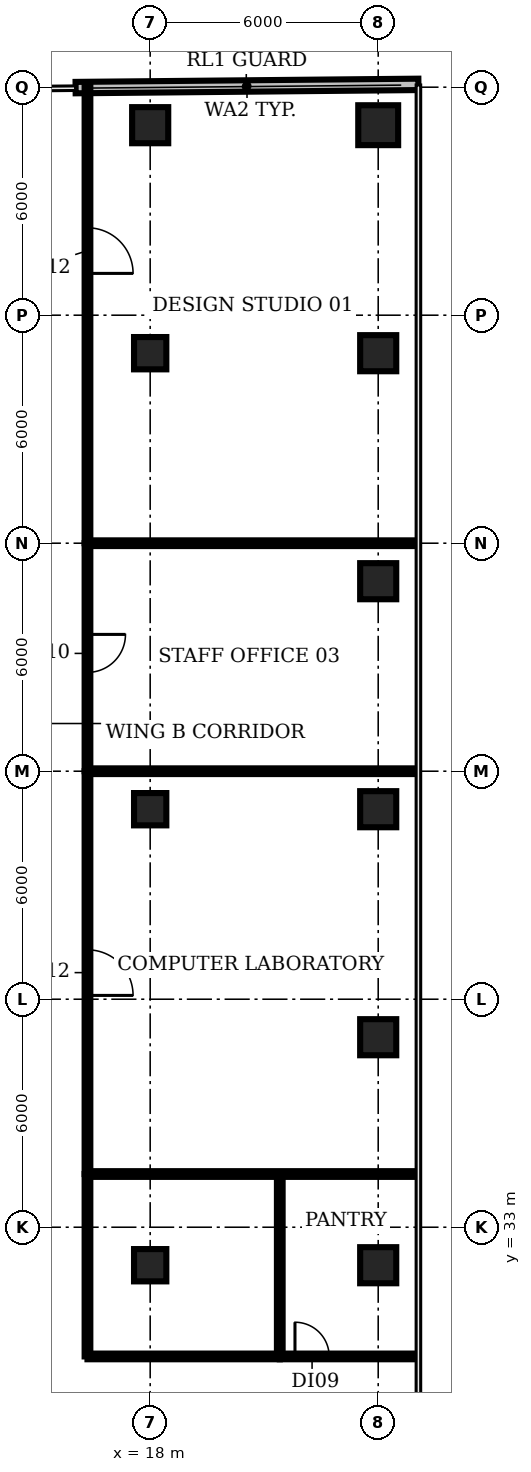
"""IFC4 building model, lengths in metres.
Left out: names, types, materials, properties, quantities, classifications, styles, units other than length and angle.
Written with IfcOpenShell. Run it as: python <this file> out.ifc"""

import sys

from ifc_helpers import new_model, si_unit, direction, frame, frame_2d, origin, origin_2d, place, context, subcontext, project, spatial, rectangle, circle, extrude, element, fill, save


model = new_model("IFC4")
c1 = context("Model", 3, precision=1e-05, world=origin(), true_north=direction((0.0, 1.0)))
c2 = subcontext(c1, "Body", "Model", "MODEL_VIEW")
j1 = project(units=[si_unit("LENGTHUNIT", "METRE"), si_unit("PLANEANGLEUNIT", "RADIAN")], contexts=[c1])
p1 = place(None, origin())
s1 = spatial("IfcSite", under=j1, at=p1, CompositionType="ELEMENT")
p2 = place(p1, origin())
s2 = spatial("IfcBuilding", under=s1, at=p2, CompositionType="ELEMENT")
p3 = place(p2, frame((0.0, 0.0, 54.2)))
s3 = spatial("IfcBuildingStorey", under=s2, at=p3, CompositionType="ELEMENT", Elevation=54.2)
for number, where, z_axis, x_axis in (
    (1, (18.0, 32.0, 0.0), (0.0, 0.0, 1.0), (1.0, 0.0, 0.0)),
    (2, (18.0, 44.0, 0.0), (0.0, 0.0, 1.0), (1.0, 0.0, 0.0)),
    (3, (18.0, 56.0, 0.0), (0.0, 0.0, 1.0), (1.0, 0.0, 0.0)),
):
    element("IfcColumn", number, at=place(p3, frame(where, z_axis=z_axis, x_axis=x_axis)), inside=s3, PredefinedType="COLUMN", context=c2, shape_type="SweptSolid", body=[
        extrude(rectangle(XDim=0.85, YDim=0.85, at=origin_2d()), origin(), (0.0, 0.0, 1.0), 3.85),
    ])
for number, where, z_axis, x_axis in (
    (4, (18.0, 62.0, 0.0), (0.0, 0.0, 1.0), (1.0, 0.0, 0.0)),
    (5, (24.0, 32.0, 0.0), (0.0, 0.0, 1.0), (1.0, 0.0, 0.0)),
    (6, (24.0, 38.0, 0.0), (0.0, 0.0, 1.0), (1.0, 0.0, 0.0)),
    (7, (24.0, 44.0, 0.0), (0.0, 0.0, 1.0), (1.0, 0.0, 0.0)),
    (8, (24.0, 50.0, 0.0), (0.0, 0.0, 1.0), (1.0, 0.0, 0.0)),
    (9, (24.0, 56.0, 0.0), (0.0, 0.0, 1.0), (1.0, 0.0, 0.0)),
):
    element("IfcColumn", number, at=place(p3, frame(where, z_axis=z_axis, x_axis=x_axis)), inside=s3, PredefinedType="COLUMN", context=c2, shape_type="SweptSolid", body=[
        extrude(rectangle(XDim=0.95, YDim=0.95, at=origin_2d()), origin(), (0.0, 0.0, 1.0), 3.85),
    ])
p4 = place(p3, frame((24.0, 62.0, 0.0), z_axis=(0.0, 0.0, 1.0), x_axis=(1.0, 0.0, 0.0)))
e10 = element("IfcColumn", 10, at=p4, inside=s3, PredefinedType="COLUMN", context=c2, shape_type="SweptSolid", body=[
    extrude(circle(Radius=0.525, at=origin_2d()), origin(), (0.0, 0.0, 1.0), 3.85),
])
p5 = place(p3, frame((25.058, 63.074, 0.0), z_axis=(0.0, 0.0, 1.0), x_axis=(-0.999955642737, -0.009418734468, 0.0)))
e11 = element("IfcWall", 11, at=p5, inside=s3, PredefinedType="SOLIDWALL", context=c2, shape_type="SweptSolid", body=[
    extrude(rectangle(XDim=9.021, YDim=0.3, at=frame_2d((4.51, 0.0))), origin(), (0.0, 0.0, 1.0), 3.85),
])
p6 = place(p3, frame((16.35, 29.6, 0.0), z_axis=(0.0, 0.0, 1.0), x_axis=(0.0, 1.0, 0.0)))
e12 = element("IfcWall", 12, at=p6, inside=s3, PredefinedType="PARTITIONING", context=c2, shape_type="SweptSolid", body=[
    extrude(rectangle(XDim=4.8, YDim=0.15, at=frame_2d((2.4, 0.0))), origin(), (0.0, 0.0, 1.0), 2.83),
])
p7 = place(p3, frame((16.35, 29.6, 0.0), z_axis=(0.0, 0.0, 1.0), x_axis=(1.0, 0.0, 0.0)))
e13 = element("IfcWall", 13, at=p7, inside=s3, PredefinedType="PARTITIONING", context=c2, shape_type="SweptSolid", body=[
    extrude(rectangle(XDim=5.06, YDim=0.15, at=frame_2d((2.53, 0.0))), origin(), (0.0, 0.0, 1.0), 2.83),
])
p8 = place(p3, frame((16.35, 34.4, 0.0), z_axis=(0.0, 0.0, 1.0), x_axis=(1.0, 0.0, 0.0)))
e14 = element("IfcWall", 14, at=p8, inside=s3, PredefinedType="PARTITIONING", context=c2, shape_type="SweptSolid", body=[
    extrude(rectangle(XDim=8.66, YDim=0.15, at=frame_2d((4.33, 0.0))), origin(), (0.0, 0.0, 1.0), 2.83),
])
p9 = place(p3, frame((16.35, 45.0, 0.0), z_axis=(0.0, 0.0, 1.0), x_axis=(0.0, -1.0, 0.0)))
e15 = element("IfcWall", 15, at=p9, inside=s3, PredefinedType="PARTITIONING", context=c2, shape_type="SweptSolid", body=[
    extrude(rectangle(XDim=10.6, YDim=0.15, at=frame_2d((5.3, 0.0))), origin(), (0.0, 0.0, 1.0), 2.83),
])
p10 = place(p9, frame((4.7, 0.0, 0.0)))
e16 = element("IfcOpeningElement", 16, at=p10, cuts=e15, PredefinedType="OPENING", context=c2, shape_type="SweptSolid", body=[
    extrude(rectangle(XDim=1.2, YDim=2.1, at=frame_2d((0.6, 1.05))), frame((0.0, 0.085, 0.0), z_axis=(0.0, -1.0, 0.0), x_axis=(1.0, 0.0, 0.0)), (0.0, 0.0, 1.0), 0.17),
])
p11 = place(p3, frame((16.35, 45.0, 0.0), z_axis=(0.0, 0.0, 1.0), x_axis=(1.0, 0.0, 0.0)))
e17 = element("IfcWall", 17, at=p11, inside=s3, PredefinedType="PARTITIONING", context=c2, shape_type="SweptSolid", body=[
    extrude(rectangle(XDim=8.66, YDim=0.15, at=frame_2d((4.33, 0.0))), origin(), (0.0, 0.0, 1.0), 2.83),
])
p12 = place(p3, frame((16.35, 51.0, 0.0), z_axis=(0.0, 0.0, 1.0), x_axis=(0.0, -1.0, 0.0)))
e18 = element("IfcWall", 18, at=p12, inside=s3, PredefinedType="PARTITIONING", context=c2, shape_type="SweptSolid", body=[
    extrude(rectangle(XDim=6.0, YDim=0.15, at=frame_2d((3.0, 0.0))), origin(), (0.0, 0.0, 1.0), 2.83),
])
p13 = place(p12, frame((2.4, 0.0, 0.0)))
e19 = element("IfcOpeningElement", 19, at=p13, cuts=e18, PredefinedType="OPENING", context=c2, shape_type="SweptSolid", body=[
    extrude(rectangle(XDim=1.0, YDim=2.1, at=frame_2d((0.5, 1.05))), frame((0.0, 0.085, 0.0), z_axis=(0.0, -1.0, 0.0), x_axis=(1.0, 0.0, 0.0)), (0.0, 0.0, 1.0), 0.17),
])
p14 = place(p3, frame((16.35, 51.0, 0.0), z_axis=(0.0, 0.0, 1.0), x_axis=(1.0, 0.0, 0.0)))
e20 = element("IfcWall", 20, at=p14, inside=s3, PredefinedType="PARTITIONING", context=c2, shape_type="SweptSolid", body=[
    extrude(rectangle(XDim=8.66, YDim=0.15, at=frame_2d((4.33, 0.0))), origin(), (0.0, 0.0, 1.0), 2.83),
])
p15 = place(p3, frame((16.35, 63.037, 0.0), z_axis=(0.0, 0.0, 1.0), x_axis=(0.0, -1.0, 0.0)))
e21 = element("IfcWall", 21, at=p15, inside=s3, PredefinedType="PARTITIONING", context=c2, shape_type="SweptSolid", body=[
    extrude(rectangle(XDim=12.037, YDim=0.15, at=frame_2d((6.018, 0.0))), origin(), (0.0, 0.0, 1.0), 2.83),
])
p16 = place(p15, frame((3.737, 0.0, 0.0)))
e22 = element("IfcOpeningElement", 22, at=p16, cuts=e21, PredefinedType="OPENING", context=c2, shape_type="SweptSolid", body=[
    extrude(rectangle(XDim=1.2, YDim=2.1, at=frame_2d((0.6, 1.05))), frame((0.0, 0.085, 0.0), z_axis=(0.0, -1.0, 0.0), x_axis=(1.0, 0.0, 0.0)), (0.0, 0.0, 1.0), 0.17),
])
p17 = place(p3, frame((21.41, 29.6, 0.0), z_axis=(0.0, 0.0, 1.0), x_axis=(0.0, 1.0, 0.0)))
e23 = element("IfcWall", 23, at=p17, inside=s3, PredefinedType="PARTITIONING", context=c2, shape_type="SweptSolid", body=[
    extrude(rectangle(XDim=4.8, YDim=0.15, at=frame_2d((2.4, 0.0))), origin(), (0.0, 0.0, 1.0), 2.83),
])
p18 = place(p3, frame((21.41, 29.6, 0.0), z_axis=(0.0, 0.0, 1.0), x_axis=(1.0, 0.0, 0.0)))
e24 = element("IfcWall", 24, at=p18, inside=s3, PredefinedType="PARTITIONING", context=c2, shape_type="SweptSolid", body=[
    extrude(rectangle(XDim=3.6, YDim=0.15, at=frame_2d((1.8, 0.0))), origin(), (0.0, 0.0, 1.0), 2.83),
])
p19 = place(p18, frame((0.4, 0.0, 0.0)))
e25 = element("IfcOpeningElement", 25, at=p19, cuts=e24, PredefinedType="OPENING", context=c2, shape_type="SweptSolid", body=[
    extrude(rectangle(XDim=0.9, YDim=2.1, at=frame_2d((0.45, 1.05))), frame((0.0, 0.085, 0.0), z_axis=(0.0, -1.0, 0.0), x_axis=(1.0, 0.0, 0.0)), (0.0, 0.0, 1.0), 0.17),
])
p20 = place(p10, origin())
e26 = element("IfcDoor", 26, at=p20, inside=s3, OperationType="SINGLE_SWING_RIGHT", PredefinedType="DOOR", context=c2, shape_type="SweptSolid", body=[
    extrude(rectangle(XDim=1.2, YDim=2.1, at=frame_2d((0.6, 1.05))), frame((0.0, 0.025, 0.0), z_axis=(0.0, -1.0, 0.0), x_axis=(1.0, 0.0, 0.0)), (0.0, 0.0, 1.0), 0.05),
])
fill(e16, e26)
p21 = place(p13, origin())
e27 = element("IfcDoor", 27, at=p21, inside=s3, OperationType="SINGLE_SWING_LEFT", PredefinedType="DOOR", context=c2, shape_type="SweptSolid", body=[
    extrude(rectangle(XDim=1.0, YDim=2.1, at=frame_2d((0.5, 1.05))), frame((0.0, 0.025, 0.0), z_axis=(0.0, -1.0, 0.0), x_axis=(1.0, 0.0, 0.0)), (0.0, 0.0, 1.0), 0.05),
])
fill(e19, e27)
p22 = place(p16, origin())
e28 = element("IfcDoor", 28, at=p22, inside=s3, OperationType="SINGLE_SWING_RIGHT", PredefinedType="DOOR", context=c2, shape_type="SweptSolid", body=[
    extrude(rectangle(XDim=1.2, YDim=2.1, at=frame_2d((0.6, 1.05))), frame((0.0, 0.025, 0.0), z_axis=(0.0, -1.0, 0.0), x_axis=(1.0, 0.0, 0.0)), (0.0, 0.0, 1.0), 0.05),
])
fill(e22, e28)
p23 = place(p19, origin())
e29 = element("IfcDoor", 29, at=p23, inside=s3, OperationType="SINGLE_SWING_LEFT", PredefinedType="DOOR", context=c2, shape_type="SweptSolid", body=[
    extrude(rectangle(XDim=0.9, YDim=2.1, at=frame_2d((0.45, 1.05))), frame((0.0, 0.025, 0.0), z_axis=(0.0, -1.0, 0.0), x_axis=(1.0, 0.0, 0.0)), (0.0, 0.0, 1.0), 0.05),
])
fill(e25, e29)
save(model, sys.argv[1])
